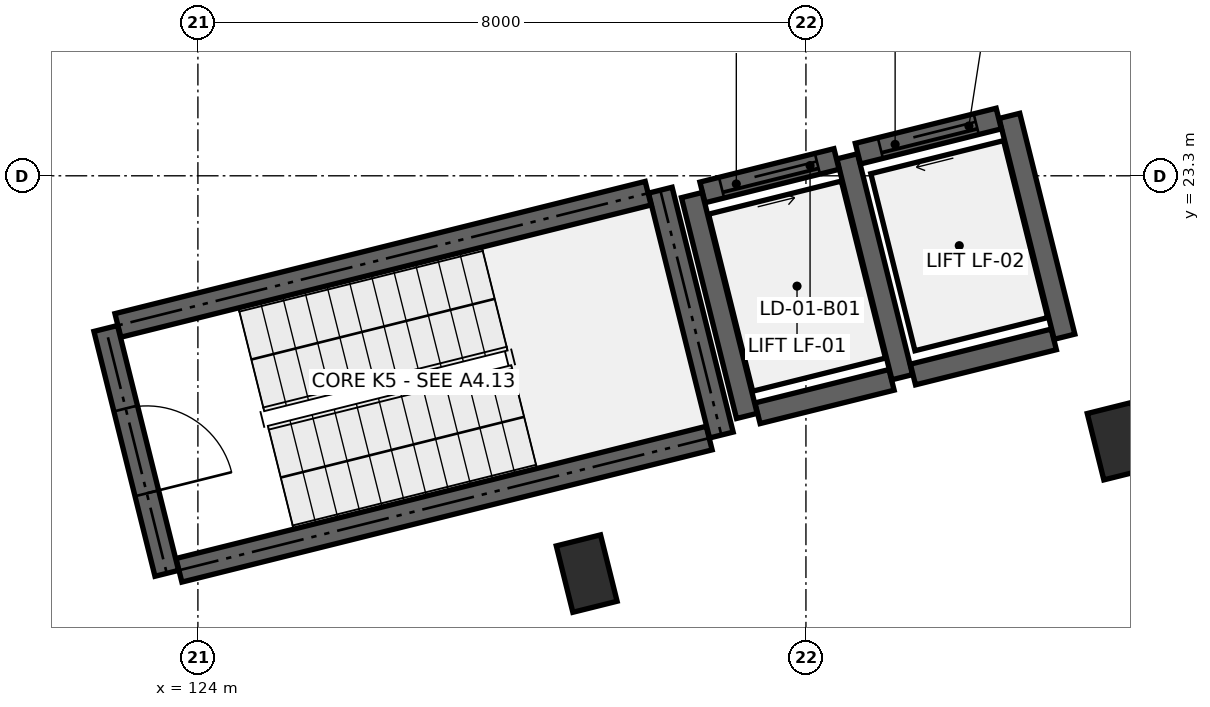
"""IFC4 building model, lengths in metres.
Left out: names, types, materials, properties, quantities, classifications, styles, units other than length and angle.
Written with IfcOpenShell. Run it as: python <this file> out.ifc"""

import sys

from ifc_helpers import new_model, si_unit, direction, frame, frame_2d, origin, origin_2d, place, context, subcontext, project, spatial, rectangle, extrude, element, fill, save


model = new_model("IFC4")
c1 = context("Model", 3, precision=1e-05, world=origin(), true_north=direction((0.0, 1.0)))
c2 = subcontext(c1, "Body", "Model", "MODEL_VIEW")
j1 = project(units=[si_unit("LENGTHUNIT", "METRE"), si_unit("PLANEANGLEUNIT", "RADIAN")], contexts=[c1])
p1 = place(None, origin())
s1 = spatial("IfcSite", under=j1, at=p1, CompositionType="ELEMENT")
p2 = place(p1, origin())
s2 = spatial("IfcBuilding", under=s1, at=p2, CompositionType="ELEMENT")
p3 = place(p2, frame((0.0, 0.0, -4.2)))
s3 = spatial("IfcBuildingStorey", under=s2, at=p3, CompositionType="ELEMENT", Elevation=-4.2)
for number, where, z_axis, x_axis in (
    (1, (129.115, 18.067, 0.0), (0.0, 0.0, 1.0), (0.97, 0.242, 0.0)),
    (2, (136.102, 19.808, 0.0), (0.0, 0.0, 1.0), (0.97, 0.242, 0.0)),
):
    element("IfcColumn", number, at=place(p3, frame(where, z_axis=z_axis, x_axis=x_axis)), inside=s3, PredefinedType="COLUMN", context=c2, shape_type="SweptSolid", body=[
        extrude(rectangle(XDim=0.6, YDim=0.9, at=origin_2d()), origin(), (0.0, 0.0, 1.0), 3.78),
    ])
p4 = place(p3, frame((123.75, 18.11, 0.0), z_axis=(0.0, 0.0, 1.0), x_axis=(0.970294108333, 0.241928384724, 0.0)))
e3 = element("IfcWall", 3, at=p4, inside=s3, PredefinedType="SHEAR", context=c2, shape_type="SweptSolid", body=[
    extrude(rectangle(XDim=7.19, YDim=0.32, at=frame_2d((3.595, 0.0))), origin(), (0.0, 0.0, 1.0), 3.78),
])
p5 = place(p3, frame((130.887, 19.889, 0.0), z_axis=(0.0, 0.0, 1.0), x_axis=(-0.241947258837, 0.970289402158, 0.0)))
e4 = element("IfcWall", 4, at=p5, inside=s3, PredefinedType="SHEAR", context=c2, shape_type="SweptSolid", body=[
    extrude(rectangle(XDim=3.32, YDim=0.32, at=frame_2d((1.66, 0.0))), origin(), (0.0, 0.0, 1.0), 3.78),
])
p6 = place(p3, frame((129.924, 23.071, 0.0), z_axis=(0.0, 0.0, 1.0), x_axis=(-0.970294108333, -0.241928384724, 0.0)))
e5 = element("IfcWall", 5, at=p6, inside=s3, PredefinedType="SHEAR", context=c2, shape_type="SweptSolid", body=[
    extrude(rectangle(XDim=7.19, YDim=0.32, at=frame_2d((3.595, 0.0))), origin(), (0.0, 0.0, 1.0), 3.78),
])
p7 = place(p3, frame((122.787, 21.292, 0.0), z_axis=(0.0, 0.0, 1.0), x_axis=(0.241860763027, -0.970310966293, 0.0)))
e6 = element("IfcWall", 6, at=p7, inside=s3, PredefinedType="SHEAR", context=c2, shape_type="SweptSolid", body=[
    extrude(rectangle(XDim=3.32, YDim=0.32, at=frame_2d((1.66, 0.0))), origin(), (0.0, 0.0, 1.0), 3.78),
])
p8 = place(p7, frame((1.085, 0.0, 0.0)))
e7 = element("IfcOpeningElement", 7, at=p8, cuts=e6, PredefinedType="OPENING", context=c2, shape_type="SweptSolid", body=[
    extrude(rectangle(XDim=1.15, YDim=2.15, at=frame_2d((0.575, 1.075))), frame((0.0, 0.172, 0.0), z_axis=(0.0, -1.0, 0.0), x_axis=(1.0, 0.0, 0.0)), (0.0, 0.0, 1.0), 0.344),
])
p9 = place(p3, frame((131.363, 20.176, 0.0), z_axis=(0.0, 0.0, 1.0), x_axis=(0.970284587517, 0.241966566341, 0.0)))
e8 = element("IfcWall", 8, at=p9, inside=s3, PredefinedType="SHEAR", context=c2, shape_type="SweptSolid", body=[
    extrude(rectangle(XDim=1.817, YDim=0.28, at=frame_2d((0.909, 0.0))), origin(), (0.0, 0.0, 1.0), 3.78),
])
p10 = place(p3, frame((133.267, 20.651, 0.0), z_axis=(0.0, 0.0, 1.0), x_axis=(-0.241921647353, 0.970295788171, 0.0)))
e9 = element("IfcWall", 9, at=p10, inside=s3, PredefinedType="SHEAR", context=c2, shape_type="SweptSolid", body=[
    extrude(rectangle(XDim=2.994, YDim=0.28, at=frame_2d((1.497, 0.0))), origin(), (0.0, 0.0, 1.0), 3.78),
])
p11 = place(p3, frame((132.402, 23.521, 0.0), z_axis=(0.0, 0.0, 1.0), x_axis=(-0.970284587517, -0.241966566341, 0.0)))
e10 = element("IfcWall", 10, at=p11, inside=s3, PredefinedType="SHEAR", context=c2, shape_type="SweptSolid", body=[
    extrude(rectangle(XDim=1.817, YDim=0.28, at=frame_2d((0.909, 0.0))), origin(), (0.0, 0.0, 1.0), 3.78),
])
p12 = place(p11, frame((0.259, 0.0, 0.0)))
e11 = element("IfcOpeningElement", 11, at=p12, cuts=e10, PredefinedType="OPENING", context=c2, shape_type="SweptSolid", body=[
    extrude(rectangle(XDim=1.3, YDim=2.2, at=frame_2d((0.65, 1.1))), frame((0.0, 0.152, 0.0), z_axis=(0.0, -1.0, 0.0), x_axis=(1.0, 0.0, 0.0)), (0.0, 0.0, 1.0), 0.304),
])
p13 = place(p3, frame((130.498, 23.046, 0.0), z_axis=(0.0, 0.0, 1.0), x_axis=(0.241921647353, -0.970295788171, 0.0)))
e12 = element("IfcWall", 12, at=p13, inside=s3, PredefinedType="SHEAR", context=c2, shape_type="SweptSolid", body=[
    extrude(rectangle(XDim=2.994, YDim=0.28, at=frame_2d((1.497, 0.0))), origin(), (0.0, 0.0, 1.0), 3.78),
])
p14 = place(p3, frame((133.408, 20.686, 0.0), z_axis=(0.0, 0.0, 1.0), x_axis=(0.970285190026, 0.241964150272, 0.0)))
e13 = element("IfcWall", 13, at=p14, inside=s3, PredefinedType="SHEAR", context=c2, shape_type="SweptSolid", body=[
    extrude(rectangle(XDim=1.91, YDim=0.28, at=frame_2d((0.955, 0.0))), origin(), (0.0, 0.0, 1.0), 3.78),
])
p15 = place(p3, frame((135.402, 21.183, 0.0), z_axis=(0.0, 0.0, 1.0), x_axis=(-0.241921647353, 0.970295788171, 0.0)))
e14 = element("IfcWall", 14, at=p15, inside=s3, PredefinedType="SHEAR", context=c2, shape_type="SweptSolid", body=[
    extrude(rectangle(XDim=2.994, YDim=0.28, at=frame_2d((1.497, 0.0))), origin(), (0.0, 0.0, 1.0), 3.78),
])
p16 = place(p3, frame((134.537, 24.053, 0.0), z_axis=(0.0, 0.0, 1.0), x_axis=(-0.970285190026, -0.241964150272, 0.0)))
e15 = element("IfcWall", 15, at=p16, inside=s3, PredefinedType="SHEAR", context=c2, shape_type="SweptSolid", body=[
    extrude(rectangle(XDim=1.91, YDim=0.28, at=frame_2d((0.955, 0.0))), origin(), (0.0, 0.0, 1.0), 3.78),
])
p17 = place(p16, frame((0.305, 0.0, 0.0)))
e16 = element("IfcOpeningElement", 16, at=p17, cuts=e15, PredefinedType="OPENING", context=c2, shape_type="SweptSolid", body=[
    extrude(rectangle(XDim=1.3, YDim=2.2, at=frame_2d((0.65, 1.1))), frame((0.0, 0.152, 0.0), z_axis=(0.0, -1.0, 0.0), x_axis=(1.0, 0.0, 0.0)), (0.0, 0.0, 1.0), 0.304),
])
p18 = place(p8, origin())
e17 = element("IfcDoor", 17, at=p18, inside=s3, OperationType="SINGLE_SWING_RIGHT", PredefinedType="DOOR", context=c2, shape_type="SweptSolid", body=[
    extrude(rectangle(XDim=1.15, YDim=2.15, at=frame_2d((0.575, 1.075))), frame((0.0, 0.025, 0.0), z_axis=(0.0, -1.0, 0.0), x_axis=(1.0, 0.0, 0.0)), (0.0, 0.0, 1.0), 0.05),
])
fill(e7, e17)
p19 = place(p12, origin())
e18 = element("IfcDoor", 18, at=p19, inside=s3, OperationType="SLIDING_TO_LEFT", PredefinedType="DOOR", context=c2, shape_type="SweptSolid", body=[
    extrude(rectangle(XDim=1.3, YDim=2.2, at=frame_2d((0.65, 1.1))), frame((0.0, 0.025, 0.0), z_axis=(0.0, -1.0, 0.0), x_axis=(1.0, 0.0, 0.0)), (0.0, 0.0, 1.0), 0.05),
])
fill(e11, e18)
p20 = place(p17, origin())
e19 = element("IfcDoor", 19, at=p20, inside=s3, OperationType="SLIDING_TO_RIGHT", PredefinedType="DOOR", context=c2, shape_type="SweptSolid", body=[
    extrude(rectangle(XDim=1.3, YDim=2.2, at=frame_2d((0.65, 1.1))), frame((0.0, 0.025, 0.0), z_axis=(0.0, -1.0, 0.0), x_axis=(1.0, 0.0, 0.0)), (0.0, 0.0, 1.0), 0.05),
])
fill(e16, e19)
save(model, sys.argv[1])
